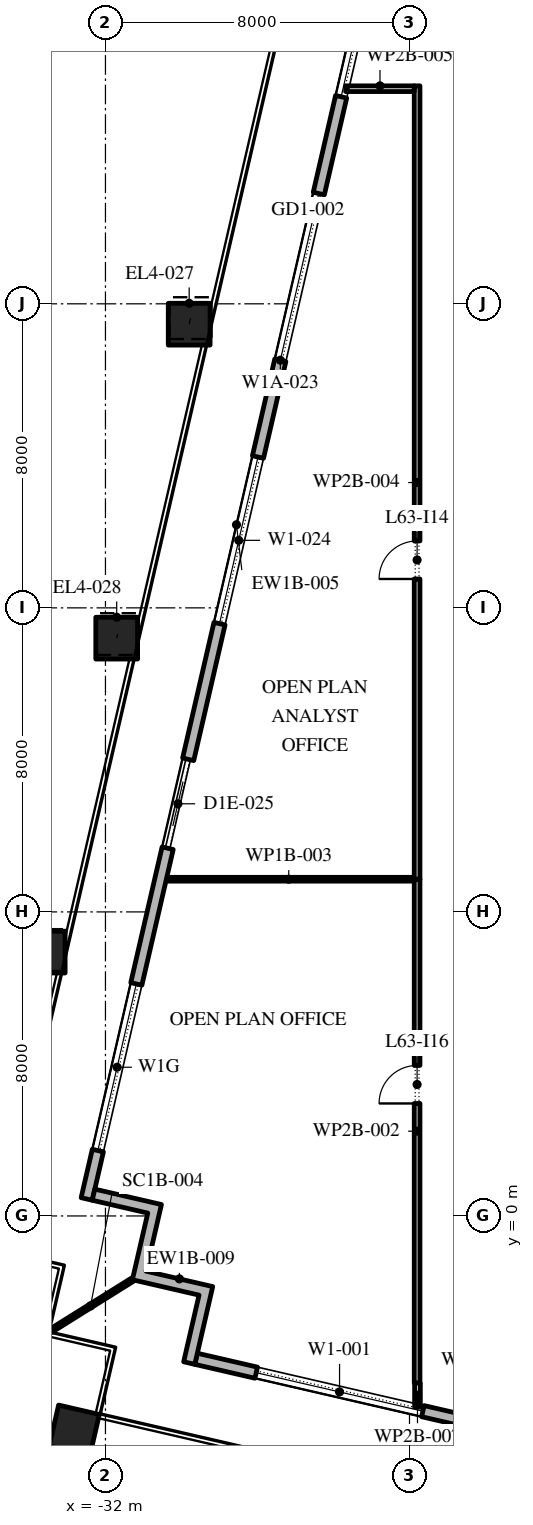
"""IFC4 building model, lengths in metres.
Left out: names, types, materials, properties, quantities, classifications, styles, units other than length and angle.
Written with IfcOpenShell. Run it as: python <this file> out.ifc"""

import sys

from ifc_helpers import new_model, si_unit, direction, frame, frame_2d, origin, origin_2d, place, context, subcontext, project, spatial, polyline, rectangle, outline, extrude, element, fill, save


model = new_model("IFC4")
c1 = context("Model", 3, precision=1e-05, world=origin(), true_north=direction((0.0, 1.0)))
c2 = subcontext(c1, "Body", "Model", "MODEL_VIEW")
j1 = project(units=[si_unit("LENGTHUNIT", "METRE"), si_unit("PLANEANGLEUNIT", "RADIAN")], contexts=[c1])
p1 = place(None, origin())
s1 = spatial("IfcSite", under=j1, at=p1, CompositionType="ELEMENT")
p2 = place(p1, origin())
s2 = spatial("IfcBuilding", under=s1, at=p2, CompositionType="ELEMENT")
p3 = place(p2, frame((0.0, 0.0, 289.2)))
s3 = spatial("IfcBuildingStorey", under=s2, at=p3, CompositionType="ELEMENT", Elevation=289.2)
p4 = place(p3, frame((-32.821, -5.635, 0.0), z_axis=(0.0, 0.0, 1.0), x_axis=(0.974370064785, -0.224951054344, 0.0)))
e1 = element("IfcColumn", 1, at=p4, inside=s3, PredefinedType="COLUMN", context=c2, shape_type="SweptSolid", body=[
    extrude(rectangle(XDim=1.1, YDim=1.1, at=origin_2d()), origin(), (0.0, 0.0, 1.0), 4.2),
])
p5 = place(p3, frame((-29.797, 23.464, 0.0), z_axis=(0.008770884695, 0.037929719907, 0.99924191662), x_axis=(-0.974290512438, 0.225295355862, 0.0)))
e2 = element("IfcColumn", 2, at=p5, inside=s3, PredefinedType="COLUMN", context=c2, shape_type="SweptSolid", body=[
    extrude(rectangle(XDim=1.1, YDim=1.1, at=origin_2d()), origin(), (0.0, 0.0, 1.0), 4.203),
])
p6 = place(p3, frame((-31.704, 15.203, 0.0), z_axis=(0.005810975449, 0.025335852957, 0.999662106474), x_axis=(-0.974691740237, 0.22355315143, 0.0)))
e3 = element("IfcColumn", 3, at=p6, inside=s3, PredefinedType="COLUMN", context=c2, shape_type="SweptSolid", body=[
    extrude(rectangle(XDim=1.1, YDim=1.1, at=origin_2d()), origin(), (0.0, 0.0, 1.0), 4.201),
])
p7 = place(p3, frame((-33.611, 6.943, 0.0), z_axis=(0.002906224189, 0.012671137464, 0.999915494498), x_axis=(-0.974691740237, 0.22355315143, 0.0)))
e4 = element("IfcColumn", 4, at=p7, inside=s3, PredefinedType="COLUMN", context=c2, shape_type="SweptSolid", body=[
    extrude(rectangle(XDim=1.1, YDim=1.1, at=origin_2d()), origin(), (0.0, 0.0, 1.0), 4.2),
])
p8 = place(p3, frame((-29.616, -3.758, 0.0), z_axis=(0.0, 0.0, 1.0), x_axis=(0.974370532314, -0.224949029246, 0.0)))
e5 = element("IfcWall", 5, at=p8, inside=s3, PredefinedType="STANDARD", context=c2, shape_type="SweptSolid", body=[
    extrude(rectangle(XDim=48.0, YDim=0.3, at=frame_2d((24.0, 0.0))), origin(), (0.0, 0.0, 1.0), 3.95),
])
p9 = place(p8, frame((1.625, 0.0, 0.45)))
e6 = element("IfcOpeningElement", 6, at=p9, cuts=e5, PredefinedType="OPENING", context=c2, shape_type="SweptSolid", body=[
    extrude(rectangle(XDim=4.5, YDim=3.05, at=frame_2d((2.25, 1.525))), frame((0.0, 0.16, 0.0), z_axis=(0.0, -1.0, 0.0), x_axis=(1.0, 0.0, 0.0)), (0.0, 0.0, 1.0), 0.32),
])
p10 = place(p8, frame((10.575, 0.0, 0.0)))
e7 = element("IfcOpeningElement", 7, at=p10, cuts=e5, PredefinedType="OPENING", context=c2, shape_type="SweptSolid", body=[
    extrude(rectangle(XDim=2.4, YDim=3.5, at=frame_2d((1.2, 1.75))), frame((0.0, 0.16, 0.0), z_axis=(0.0, -1.0, 0.0), x_axis=(1.0, 0.0, 0.0)), (0.0, 0.0, 1.0), 0.32),
])
p11 = place(p8, frame((17.575, 0.0, 0.45)))
e8 = element("IfcOpeningElement", 8, at=p11, cuts=e5, PredefinedType="OPENING", context=c2, shape_type="SweptSolid", body=[
    extrude(rectangle(XDim=4.5, YDim=3.05, at=frame_2d((2.25, 1.525))), frame((0.0, 0.16, 0.0), z_axis=(0.0, -1.0, 0.0), x_axis=(1.0, 0.0, 0.0)), (0.0, 0.0, 1.0), 0.32),
])
p12 = place(p8, frame((25.625, 0.0, 0.45)))
e9 = element("IfcOpeningElement", 9, at=p12, cuts=e5, PredefinedType="OPENING", context=c2, shape_type="SweptSolid", body=[
    extrude(rectangle(XDim=4.5, YDim=2.9, at=frame_2d((2.25, 1.45))), frame((0.0, 0.16, 0.0), z_axis=(0.0, -1.0, 0.0), x_axis=(1.0, 0.0, 0.0)), (0.0, 0.0, 1.0), 0.32),
])
p13 = place(p8, frame((33.675, 0.0, 0.45)))
e10 = element("IfcOpeningElement", 10, at=p13, cuts=e5, PredefinedType="OPENING", context=c2, shape_type="SweptSolid", body=[
    extrude(rectangle(XDim=4.5, YDim=3.05, at=frame_2d((2.25, 1.525))), frame((0.0, 0.16, 0.0), z_axis=(0.0, -1.0, 0.0), x_axis=(1.0, 0.0, 0.0)), (0.0, 0.0, 1.0), 0.32),
])
p14 = place(p8, frame((42.775, 0.0, 0.0)))
e11 = element("IfcOpeningElement", 11, at=p14, cuts=e5, PredefinedType="OPENING", context=c2, shape_type="SweptSolid", body=[
    extrude(rectangle(XDim=2.4, YDim=3.15, at=frame_2d((1.2, 1.575))), frame((0.0, 0.16, 0.0), z_axis=(0.0, -1.0, 0.0), x_axis=(1.0, 0.0, 0.0)), (0.0, 0.0, 1.0), 0.32),
])
p15 = place(p3, origin())
e12 = element("IfcWall", 12, at=p15, inside=s3, PredefinedType="STANDARD", context=c2, shape_type="SweptSolid", body=[
    extrude(outline(polyline([(-31.291, -1.678), (-30.886, 0.076), (-32.348, 0.413), (-32.28, 0.705), (-30.526, 0.301), (-30.931, -1.453), (-29.177, -1.858), (-29.65, -3.905), (-29.942, -3.837), (-29.537, -2.083), (-31.291, -1.678)])), origin(), (0.0, 0.0, 1.0), 3.95),
])
p16 = place(p3, frame((-31.291, -1.678, -0.05), z_axis=(0.0, 0.0, 1.0), x_axis=(-0.84807753525, -0.529872148923, 0.0)))
e13 = element("IfcWall", 13, at=p16, inside=s3, PredefinedType="STANDARD", context=c2, shape_type="SweptSolid", body=[
    extrude(rectangle(XDim=2.596, YDim=0.1, at=frame_2d((1.298, 0.0))), origin(), (0.0, 0.0, 1.0), 4.0),
])
p17 = place(p3, frame((-23.8, -4.4, 0.0), z_axis=(0.0, 0.0, 1.0), x_axis=(0.0, 1.0, 0.0)))
e14 = element("IfcWall", 14, at=p17, inside=s3, PredefinedType="PARTITIONING", context=c2, shape_type="SweptSolid", body=[
    extrude(rectangle(XDim=13.26, YDim=0.15, at=frame_2d((6.63, 0.0))), origin(), (0.0, 0.0, 1.0), 3.95),
])
p18 = place(p17, frame((7.36, 0.0, 0.0)))
e15 = element("IfcOpeningElement", 15, at=p18, cuts=e14, PredefinedType="OPENING", context=c2, shape_type="SweptSolid", body=[
    extrude(rectangle(XDim=1.0, YDim=2.1, at=frame_2d((0.5, 1.05))), frame((0.0, 0.085, 0.0), z_axis=(0.0, -1.0, 0.0), x_axis=(1.0, 0.0, 0.0)), (0.0, 0.0, 1.0), 0.17),
])
p19 = place(p3, frame((-23.875, 8.86, 0.0), z_axis=(0.0, 0.0, 1.0), x_axis=(-1.0, 0.0, 0.0)))
e16 = element("IfcWall", 16, at=p19, inside=s3, PredefinedType="PARTITIONING", context=c2, shape_type="SweptSolid", body=[
    extrude(rectangle(XDim=6.605, YDim=0.1, at=frame_2d((3.302, 0.0))), origin(), (0.0, 0.0, 1.0), 3.95),
])
p20 = place(p3, frame((-23.8, 8.86, 0.0), z_axis=(0.0, 0.0, 1.0), x_axis=(0.0, 1.0, 0.0)))
e17 = element("IfcWall", 17, at=p20, inside=s3, PredefinedType="PARTITIONING", context=c2, shape_type="SweptSolid", body=[
    extrude(rectangle(XDim=20.875, YDim=0.15, at=frame_2d((10.438, 0.0))), origin(), (0.0, 0.0, 1.0), 3.95),
])
p21 = place(p20, frame((7.9, 0.0, 0.0)))
e18 = element("IfcOpeningElement", 18, at=p21, cuts=e17, PredefinedType="OPENING", context=c2, shape_type="SweptSolid", body=[
    extrude(rectangle(XDim=1.0, YDim=2.1, at=frame_2d((0.5, 1.05))), frame((0.0, 0.085, 0.0), z_axis=(0.0, -1.0, 0.0), x_axis=(1.0, 0.0, 0.0)), (0.0, 0.0, 1.0), 0.17),
])
p22 = place(p3, frame((-23.875, 29.66, 0.0), z_axis=(0.0, 0.0, 1.0), x_axis=(-1.0, 0.0, 0.0)))
e19 = element("IfcWall", 19, at=p22, inside=s3, PredefinedType="PARTITIONING", context=c2, shape_type="SweptSolid", body=[
    extrude(rectangle(XDim=1.803, YDim=0.15, at=frame_2d((0.901, 0.0))), origin(), (0.0, 0.0, 1.0), 3.95),
])
p23 = place(p3, frame((-23.79, -5.032, 0.0), z_axis=(0.0, 0.0, 1.0), x_axis=(0.0, 1.0, 0.0)))
e20 = element("IfcWall", 20, at=p23, inside=s3, PredefinedType="PARTITIONING", context=c2, shape_type="SweptSolid", body=[
    extrude(rectangle(XDim=0.632, YDim=0.15, at=frame_2d((0.316, 0.0))), origin(), (0.0, 0.0, 1.0), 3.95),
])
p24 = place(p3, frame((-24.318, 35.859, 0.0), z_axis=(0.0, 0.0, 1.0), x_axis=(-0.224948304833, -0.974370699556, 0.0)))
e21 = element("IfcWall", 21, at=p24, inside=s3, PredefinedType="STANDARD", context=c2, shape_type="SweptSolid", body=[
    extrude(rectangle(XDim=36.344, YDim=0.3, at=frame_2d((18.172, 0.0))), origin(), (0.0, 0.0, 1.0), 3.95),
])
p25 = place(p24, frame((2.08, 0.0, 0.45)))
e22 = element("IfcOpeningElement", 22, at=p25, cuts=e21, PredefinedType="OPENING", context=c2, shape_type="SweptSolid", body=[
    extrude(rectangle(XDim=4.5, YDim=3.0, at=frame_2d((2.25, 1.5))), frame((0.0, 0.16, 0.0), z_axis=(0.0, -1.0, 0.0), x_axis=(1.0, 0.0, 0.0)), (0.0, 0.0, 1.0), 0.32),
])
p26 = place(p24, frame((9.194, 0.0, 0.45)))
e23 = element("IfcOpeningElement", 23, at=p26, cuts=e21, PredefinedType="OPENING", context=c2, shape_type="SweptSolid", body=[
    extrude(rectangle(XDim=4.5, YDim=3.0, at=frame_2d((2.25, 1.5))), frame((0.0, 0.16, 0.0), z_axis=(0.0, -1.0, 0.0), x_axis=(1.0, 0.0, 0.0)), (0.0, 0.0, 1.0), 0.32),
])
p27 = place(p24, frame((16.308, 0.0, 0.45)))
e24 = element("IfcOpeningElement", 24, at=p27, cuts=e21, PredefinedType="OPENING", context=c2, shape_type="SweptSolid", body=[
    extrude(rectangle(XDim=4.5, YDim=3.05, at=frame_2d((2.25, 1.525))), frame((0.0, 0.16, 0.0), z_axis=(0.0, -1.0, 0.0), x_axis=(1.0, 0.0, 0.0)), (0.0, 0.0, 1.0), 0.32),
])
p28 = place(p24, frame((24.472, 0.0, 0.0)))
e25 = element("IfcOpeningElement", 25, at=p28, cuts=e21, PredefinedType="OPENING", context=c2, shape_type="SweptSolid", body=[
    extrude(rectangle(XDim=2.4, YDim=3.275, at=frame_2d((1.2, 1.637))), frame((0.0, 0.16, 0.0), z_axis=(0.0, -1.0, 0.0), x_axis=(1.0, 0.0, 0.0)), (0.0, 0.0, 1.0), 0.32),
])
p29 = place(p24, frame((30.537, 0.0, 0.45)))
e26 = element("IfcOpeningElement", 26, at=p29, cuts=e21, PredefinedType="OPENING", context=c2, shape_type="SweptSolid", body=[
    extrude(rectangle(XDim=4.5, YDim=2.775, at=frame_2d((2.25, 1.387))), frame((0.0, 0.16, 0.0), z_axis=(0.0, -1.0, 0.0), x_axis=(1.0, 0.0, 0.0)), (0.0, 0.0, 1.0), 0.32),
])
p30 = place(p9, origin())
e27 = element("IfcWindow", 27, at=p30, inside=s3, PartitioningType="DOUBLE_PANEL_VERTICAL", PredefinedType="WINDOW", context=c2, shape_type="SweptSolid", body=[
    extrude(rectangle(XDim=4.5, YDim=3.05, at=frame_2d((2.25, 1.525))), frame((0.0, 0.03, 0.0), z_axis=(0.0, -1.0, 0.0), x_axis=(1.0, 0.0, 0.0)), (0.0, 0.0, 1.0), 0.06),
])
fill(e6, e27)
p31 = place(p25, origin())
e28 = element("IfcWindow", 28, at=p31, inside=s3, PartitioningType="DOUBLE_PANEL_VERTICAL", PredefinedType="WINDOW", context=c2, shape_type="SweptSolid", body=[
    extrude(rectangle(XDim=4.5, YDim=3.0, at=frame_2d((2.25, 1.5))), frame((0.0, 0.03, 0.0), z_axis=(0.0, -1.0, 0.0), x_axis=(1.0, 0.0, 0.0)), (0.0, 0.0, 1.0), 0.06),
])
fill(e22, e28)
p32 = place(p26, origin())
e29 = element("IfcWindow", 29, at=p32, inside=s3, PartitioningType="DOUBLE_PANEL_VERTICAL", PredefinedType="WINDOW", context=c2, shape_type="SweptSolid", body=[
    extrude(rectangle(XDim=4.5, YDim=3.0, at=frame_2d((2.25, 1.5))), frame((0.0, 0.03, 0.0), z_axis=(0.0, -1.0, 0.0), x_axis=(1.0, 0.0, 0.0)), (0.0, 0.0, 1.0), 0.06),
])
fill(e23, e29)
p33 = place(p27, origin())
e30 = element("IfcWindow", 30, at=p33, inside=s3, PartitioningType="DOUBLE_PANEL_VERTICAL", PredefinedType="WINDOW", context=c2, shape_type="SweptSolid", body=[
    extrude(rectangle(XDim=4.5, YDim=3.05, at=frame_2d((2.25, 1.525))), frame((0.0, 0.03, 0.0), z_axis=(0.0, -1.0, 0.0), x_axis=(1.0, 0.0, 0.0)), (0.0, 0.0, 1.0), 0.06),
])
fill(e24, e30)
p34 = place(p28, origin())
e31 = element("IfcDoor", 31, at=p34, inside=s3, OperationType="DOUBLE_DOOR_SLIDING", PredefinedType="DOOR", context=c2, shape_type="SweptSolid", body=[
    extrude(rectangle(XDim=2.4, YDim=3.275, at=frame_2d((1.2, 1.637))), frame((0.0, 0.025, 0.0), z_axis=(0.0, -1.0, 0.0), x_axis=(1.0, 0.0, 0.0)), (0.0, 0.0, 1.0), 0.05),
])
fill(e25, e31)
p35 = place(p29, origin())
e32 = element("IfcWindow", 32, at=p35, inside=s3, PartitioningType="DOUBLE_PANEL_VERTICAL", PredefinedType="WINDOW", context=c2, shape_type="SweptSolid", body=[
    extrude(rectangle(XDim=4.5, YDim=2.775, at=frame_2d((2.25, 1.387))), frame((0.0, 0.03, 0.0), z_axis=(0.0, -1.0, 0.0), x_axis=(1.0, 0.0, 0.0)), (0.0, 0.0, 1.0), 0.06),
])
fill(e26, e32)
p36 = place(p21, origin())
e33 = element("IfcDoor", 33, at=p36, inside=s3, OperationType="SINGLE_SWING_RIGHT", PredefinedType="DOOR", context=c2, shape_type="SweptSolid", body=[
    extrude(rectangle(XDim=1.0, YDim=2.1, at=frame_2d((0.5, 1.05))), frame((0.0, 0.025, 0.0), z_axis=(0.0, -1.0, 0.0), x_axis=(1.0, 0.0, 0.0)), (0.0, 0.0, 1.0), 0.05),
])
fill(e18, e33)
p37 = place(p18, origin())
e34 = element("IfcDoor", 34, at=p37, inside=s3, OperationType="SINGLE_SWING_RIGHT", PredefinedType="DOOR", context=c2, shape_type="SweptSolid", body=[
    extrude(rectangle(XDim=1.0, YDim=2.1, at=frame_2d((0.5, 1.05))), frame((0.0, 0.025, 0.0), z_axis=(0.0, -1.0, 0.0), x_axis=(1.0, 0.0, 0.0)), (0.0, 0.0, 1.0), 0.05),
])
fill(e15, e34)
save(model, sys.argv[1])
